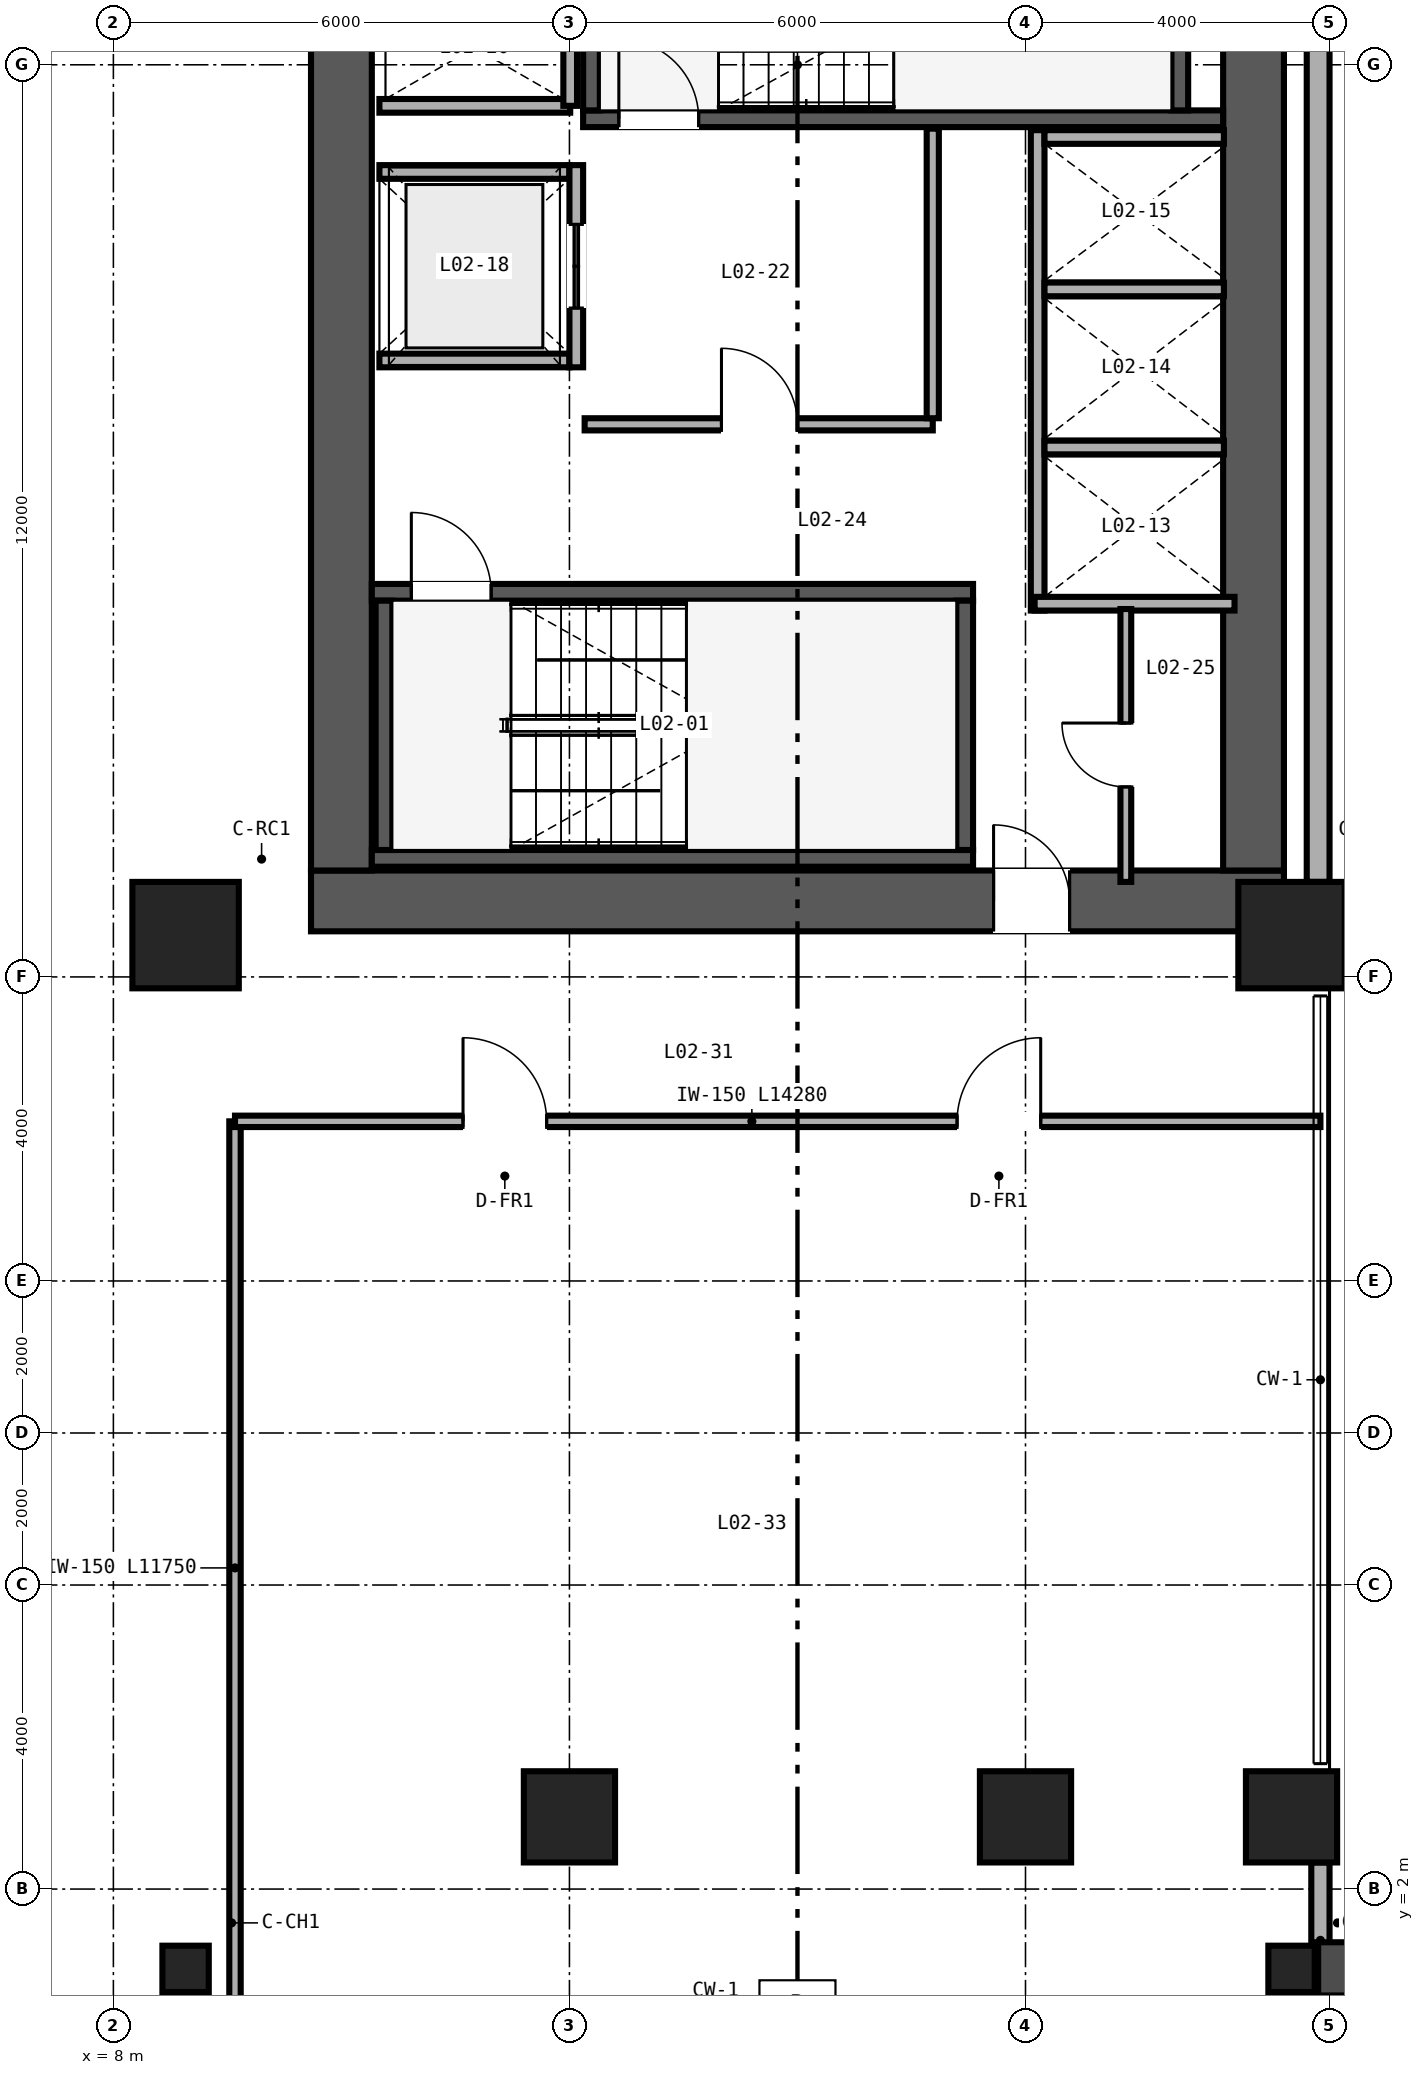
"""IFC4 building model, lengths in metres.
Left out: names, types, materials, properties, quantities, classifications, styles, units other than length and angle.
Written with IfcOpenShell. Run it as: python <this file> out.ifc"""

import sys

from ifc_helpers import new_model, si_unit, direction, frame, frame_2d, origin, origin_2d, place, context, subcontext, project, spatial, rectangle, hollow_circle, extrude, source, transform, mapped, element, fill, save


model = new_model("IFC4")
c1 = context("Model", 3, precision=1e-05, world=origin(), true_north=direction((0.0, 1.0)))
c2 = subcontext(c1, "Body", "Model", "MODEL_VIEW")
j1 = project(units=[si_unit("LENGTHUNIT", "METRE"), si_unit("PLANEANGLEUNIT", "RADIAN")], contexts=[c1])
p1 = place(None, origin())
s1 = spatial("IfcSite", under=j1, at=p1, CompositionType="ELEMENT")
p2 = place(p1, origin())
s2 = spatial("IfcBuilding", under=s1, at=p2, CompositionType="ELEMENT")
p3 = place(p2, frame((0.0, 0.0, 6.0)))
s3 = spatial("IfcBuildingStorey", under=s2, at=p3, CompositionType="ELEMENT", Elevation=6.0)
p4 = place(p3, frame((10.6, 15.0, 0.0), z_axis=(0.0, 0.0, 1.0), x_axis=(1.0, 0.0, 0.0)))
e1 = element("IfcWall", 1, at=p4, inside=s3, PredefinedType="SHEAR", context=c2, shape_type="SweptSolid", body=[
    extrude(rectangle(XDim=12.8, YDim=0.8, at=frame_2d((6.4, 0.0))), origin(), (0.0, 0.0, 1.0), 5.08),
])
p5 = place(p4, frame((8.98, 0.0, 0.0)))
e2 = element("IfcOpeningElement", 2, at=p5, cuts=e1, PredefinedType="OPENING", context=c2, shape_type="SweptSolid", body=[
    extrude(rectangle(XDim=1.0, YDim=2.15, at=frame_2d((0.5, 1.075))), frame((0.0, 0.41, 0.0), z_axis=(0.0, -1.0, 0.0), x_axis=(1.0, 0.0, 0.0)), (0.0, 0.0, 1.0), 0.82),
])
for number, where, z_axis, x_axis in (
    (3, (11.0, 15.4, 0.0), (0.0, 0.0, 1.0), (0.0, 1.0, 0.0)),
    (4, (23.0, 15.4, 0.0), (0.0, 0.0, 1.0), (0.0, 1.0, 0.0)),
):
    element("IfcWall", number, at=place(p3, frame(where, z_axis=z_axis, x_axis=x_axis)), inside=s3, PredefinedType="SHEAR", context=c2, shape_type="SweptSolid", body=[
        extrude(rectangle(XDim=21.2, YDim=0.8, at=frame_2d((10.6, 0.0))), origin(), (0.0, 0.0, 1.0), 5.08),
    ])
p6 = place(p3, frame((11.4, 15.56, 0.0), z_axis=(0.0, 0.0, 1.0), x_axis=(1.0, 0.0, 0.0)))
e5 = element("IfcWall", 5, at=p6, inside=s3, PredefinedType="SHEAR", context=c2, shape_type="SweptSolid", body=[
    extrude(rectangle(XDim=7.91, YDim=0.22, at=frame_2d((3.955, 0.0))), origin(), (0.0, 0.0, 1.0), 5.2),
])
p7 = place(p3, frame((11.4, 19.06, 0.0), z_axis=(0.0, 0.0, 1.0), x_axis=(1.0, 0.0, 0.0)))
e6 = element("IfcWall", 6, at=p7, inside=s3, PredefinedType="SHEAR", context=c2, shape_type="SweptSolid", body=[
    extrude(rectangle(XDim=7.91, YDim=0.22, at=frame_2d((3.955, 0.0))), origin(), (0.0, 0.0, 1.0), 5.2),
])
p8 = place(p7, frame((0.52, 0.0, 0.0)))
e7 = element("IfcOpeningElement", 7, at=p8, cuts=e6, PredefinedType="OPENING", context=c2, shape_type="SweptSolid", body=[
    extrude(rectangle(XDim=1.05, YDim=2.15, at=frame_2d((0.525, 1.075))), frame((0.0, 0.12, 0.0), z_axis=(0.0, -1.0, 0.0), x_axis=(1.0, 0.0, 0.0)), (0.0, 0.0, 1.0), 0.24),
])
for number, where, z_axis, x_axis in (
    (8, (11.56, 15.67, 0.0), (0.0, 0.0, 1.0), (0.0, 1.0, 0.0)),
    (9, (19.2, 15.67, 0.0), (0.0, 0.0, 1.0), (0.0, 1.0, 0.0)),
):
    element("IfcWall", number, at=place(p3, frame(where, z_axis=z_axis, x_axis=x_axis)), inside=s3, PredefinedType="SHEAR", context=c2, shape_type="SweptSolid", body=[
        extrude(rectangle(XDim=3.28, YDim=0.22, at=frame_2d((1.64, 0.0))), origin(), (0.0, 0.0, 1.0), 5.2),
    ])
p9 = place(p3, frame((14.18, 25.29, 0.0), z_axis=(0.0, 0.0, 1.0), x_axis=(1.0, 0.0, 0.0)))
e10 = element("IfcWall", 10, at=p9, inside=s3, PredefinedType="SHEAR", context=c2, shape_type="SweptSolid", body=[
    extrude(rectangle(XDim=8.42, YDim=0.22, at=frame_2d((4.21, 0.0))), origin(), (0.0, 0.0, 1.0), 5.2),
])
p10 = place(p9, frame((0.47, 0.0, 0.0)))
e11 = element("IfcOpeningElement", 11, at=p10, cuts=e10, PredefinedType="OPENING", context=c2, shape_type="SweptSolid", body=[
    extrude(rectangle(XDim=1.05, YDim=2.15, at=frame_2d((0.525, 1.075))), frame((0.0, 0.12, 0.0), z_axis=(0.0, -1.0, 0.0), x_axis=(1.0, 0.0, 0.0)), (0.0, 0.0, 1.0), 0.24),
])
for number, where, z_axis, x_axis in (
    (12, (14.29, 25.4, 0.0), (0.0, 0.0, 1.0), (0.0, 1.0, 0.0)),
    (13, (22.03, 25.4, 0.0), (0.0, 0.0, 1.0), (0.0, 1.0, 0.0)),
):
    element("IfcWall", number, at=place(p3, frame(where, z_axis=z_axis, x_axis=x_axis)), inside=s3, PredefinedType="SHEAR", context=c2, shape_type="SweptSolid", body=[
        extrude(rectangle(XDim=3.28, YDim=0.22, at=frame_2d((1.64, 0.0))), origin(), (0.0, 0.0, 1.0), 5.2),
    ])
m1 = source(origin(), c2, "Body", "SweptSolid", [
    extrude(hollow_circle(Radius=0.305, WallThickness=0.025, at=origin_2d()), origin(), (0.0, 0.0, 1.0), 5.08),
])
for number, where, z_axis, x_axis in (
    (14, (8.95, 0.95, 0.0), (0.0, 0.0, 1.0), (1.0, 0.0, 0.0)),
    (15, (23.5, 0.95, 0.0), (0.0, 0.0, 1.0), (1.0, 0.0, 0.0)),
):
    element("IfcColumn", number, at=place(p3, frame(where, z_axis=z_axis, x_axis=x_axis)), inside=s3, PredefinedType="COLUMN", context=c2, shape_type="MappedRepresentation", body=[
        mapped(m1, transform((0.0, 0.0, 0.0), scale=1.0)),
    ])
m2 = source(origin(), c2, "Body", "SweptSolid", [
    extrude(rectangle(XDim=1.4, YDim=1.4, at=origin_2d()), origin(), (0.0, 0.0, 1.0), 5.08),
])
for number, where, z_axis, x_axis in (
    (16, (8.95, 14.55, 0.0), (0.0, 0.0, 1.0), (1.0, 0.0, 0.0)),
    (17, (23.5, 14.55, 0.0), (0.0, 0.0, 1.0), (1.0, 0.0, 0.0)),
):
    element("IfcColumn", number, at=place(p3, frame(where, z_axis=z_axis, x_axis=x_axis)), inside=s3, PredefinedType="COLUMN", context=c2, shape_type="MappedRepresentation", body=[
        mapped(m2, transform((0.0, 0.0, 0.0), scale=1.0)),
    ])
m3 = source(origin(), c2, "Body", "SweptSolid", [
    extrude(rectangle(XDim=1.2, YDim=1.2, at=origin_2d()), origin(), (0.0, 0.0, 1.0), 5.08),
])
for number, where, z_axis, x_axis in (
    (18, (14.0, 2.95, 0.0), (0.0, 0.0, 1.0), (1.0, 0.0, 0.0)),
    (19, (20.0, 2.95, 0.0), (0.0, 0.0, 1.0), (1.0, 0.0, 0.0)),
    (20, (23.5, 2.95, 0.0), (0.0, 0.0, 1.0), (1.0, 0.0, 0.0)),
):
    element("IfcColumn", number, at=place(p3, frame(where, z_axis=z_axis, x_axis=x_axis)), inside=s3, PredefinedType="COLUMN", context=c2, shape_type="MappedRepresentation", body=[
        mapped(m3, transform((0.0, 0.0, 0.0), scale=1.0)),
    ])
p11 = place(p3, frame((23.88, 0.3, 0.0), z_axis=(0.0, 0.0, 1.0), x_axis=(0.0, 1.0, 0.0)))
e21 = element("IfcWall", 21, at=p11, inside=s3, PredefinedType="SOLIDWALL", context=c2, shape_type="SweptSolid", body=[
    extrude(rectangle(XDim=2.05, YDim=0.24, at=frame_2d((1.025, 0.0))), origin(), (0.0, 0.0, 1.0), 4.153),
])
p12 = place(p3, frame((23.85, 15.25, 0.0), z_axis=(0.0, 0.0, 1.0), x_axis=(0.0, 1.0, 0.0)))
e22 = element("IfcWall", 22, at=p12, inside=s3, PredefinedType="SOLIDWALL", context=c2, shape_type="SweptSolid", body=[
    extrude(rectangle(XDim=12.2, YDim=0.3, at=frame_2d((6.1, 0.0))), origin(), (0.0, 0.0, 1.0), 4.301),
])
p13 = place(p3, frame((20.16, 18.82, 0.0), z_axis=(0.0, 0.0, 1.0), x_axis=(0.0, 1.0, 0.0)))
e23 = element("IfcWall", 23, at=p13, inside=s3, PredefinedType="SOLIDWALL", context=c2, shape_type="SweptSolid", body=[
    extrude(rectangle(XDim=6.32, YDim=0.18, at=frame_2d((3.16, 0.0))), origin(), (0.0, 0.0, 1.0), 3.98),
])
p14 = place(p3, frame((20.12, 18.91, 0.0), z_axis=(0.0, 0.0, 1.0), x_axis=(1.0, 0.0, 0.0)))
e24 = element("IfcWall", 24, at=p14, inside=s3, PredefinedType="SOLIDWALL", context=c2, shape_type="SweptSolid", body=[
    extrude(rectangle(XDim=2.63, YDim=0.18, at=frame_2d((1.315, 0.0))), origin(), (0.0, 0.0, 1.0), 5.08),
])
p15 = place(p3, frame((20.25, 25.05, 0.0), z_axis=(0.0, 0.0, 1.0), x_axis=(1.0, 0.0, 0.0)))
e25 = element("IfcWall", 25, at=p15, inside=s3, PredefinedType="SOLIDWALL", context=c2, shape_type="SweptSolid", body=[
    extrude(rectangle(XDim=2.36, YDim=0.18, at=frame_2d((1.18, 0.0))), origin(), (0.0, 0.0, 1.0), 5.08),
])
p16 = place(p3, frame((20.25, 20.965, 0.0), z_axis=(0.0, 0.0, 1.0), x_axis=(1.0, 0.0, 0.0)))
e26 = element("IfcWall", 26, at=p16, inside=s3, PredefinedType="SOLIDWALL", context=c2, shape_type="SweptSolid", body=[
    extrude(rectangle(XDim=2.36, YDim=0.18, at=frame_2d((1.18, 0.0))), origin(), (0.0, 0.0, 1.0), 3.98),
])
p17 = place(p3, frame((20.25, 23.045, 0.0), z_axis=(0.0, 0.0, 1.0), x_axis=(1.0, 0.0, 0.0)))
e27 = element("IfcWall", 27, at=p17, inside=s3, PredefinedType="SOLIDWALL", context=c2, shape_type="SweptSolid", body=[
    extrude(rectangle(XDim=2.36, YDim=0.18, at=frame_2d((1.18, 0.0))), origin(), (0.0, 0.0, 1.0), 5.08),
])
for number, where, z_axis, x_axis in (
    (28, (11.5, 22.11, 0.0), (0.0, 0.0, 1.0), (1.0, 0.0, 0.0)),
    (29, (11.5, 24.59, 0.0), (0.0, 0.0, 1.0), (1.0, 0.0, 0.0)),
):
    element("IfcWall", number, at=place(p3, frame(where, z_axis=z_axis, x_axis=x_axis)), inside=s3, PredefinedType="SOLIDWALL", context=c2, shape_type="SweptSolid", body=[
        extrude(rectangle(XDim=2.5, YDim=0.18, at=frame_2d((1.25, 0.0))), origin(), (0.0, 0.0, 1.0), 5.08),
    ])
p18 = place(p3, frame((14.09, 22.02, 0.0), z_axis=(0.0, 0.0, 1.0), x_axis=(0.0, 1.0, 0.0)))
e30 = element("IfcWall", 30, at=p18, inside=s3, PredefinedType="SOLIDWALL", context=c2, shape_type="SweptSolid", body=[
    extrude(rectangle(XDim=2.66, YDim=0.18, at=frame_2d((1.33, 0.0))), origin(), (0.0, 0.0, 1.0), 5.08),
])
p19 = place(p18, frame((0.78, 0.0, 0.0)))
e31 = element("IfcOpeningElement", 31, at=p19, cuts=e30, PredefinedType="OPENING", context=c2, shape_type="SweptSolid", body=[
    extrude(rectangle(XDim=1.1, YDim=2.2, at=frame_2d((0.55, 1.1))), frame((0.0, 0.1, 0.0), z_axis=(0.0, -1.0, 0.0), x_axis=(1.0, 0.0, 0.0)), (0.0, 0.0, 1.0), 0.2),
])
p20 = place(p3, frame((11.5, 25.46, 0.0), z_axis=(0.0, 0.0, 1.0), x_axis=(1.0, 0.0, 0.0)))
e32 = element("IfcWall", 32, at=p20, inside=s3, PredefinedType="SOLIDWALL", context=c2, shape_type="SweptSolid", body=[
    extrude(rectangle(XDim=2.51, YDim=0.18, at=frame_2d((1.255, 0.0))), origin(), (0.0, 0.0, 1.0), 5.08),
])
p21 = place(p3, frame((14.01, 25.46, 0.0), z_axis=(0.0, 0.0, 1.0), x_axis=(0.0, 1.0, 0.0)))
e33 = element("IfcWall", 33, at=p21, inside=s3, PredefinedType="SOLIDWALL", context=c2, shape_type="SweptSolid", body=[
    extrude(rectangle(XDim=3.08, YDim=0.18, at=frame_2d((1.54, 0.0))), origin(), (0.0, 0.0, 1.0), 5.08),
])
p22 = place(p3, frame((14.2, 21.27, 0.0), z_axis=(0.0, 0.0, 1.0), x_axis=(1.0, 0.0, 0.0)))
e34 = element("IfcWall", 34, at=p22, inside=s3, PredefinedType="PARTITIONING", context=c2, shape_type="SweptSolid", body=[
    extrude(rectangle(XDim=4.58, YDim=0.16, at=frame_2d((2.29, 0.0))), origin(), (0.0, 0.0, 1.0), 5.08),
])
p23 = place(p22, frame((1.8, 0.0, 0.0)))
e35 = element("IfcOpeningElement", 35, at=p23, cuts=e34, PredefinedType="OPENING", context=c2, shape_type="SweptSolid", body=[
    extrude(rectangle(XDim=1.0, YDim=2.15, at=frame_2d((0.5, 1.075))), frame((0.0, 0.09, 0.0), z_axis=(0.0, -1.0, 0.0), x_axis=(1.0, 0.0, 0.0)), (0.0, 0.0, 1.0), 0.18),
])
p24 = place(p3, frame((18.78, 21.35, 0.0), z_axis=(0.0, 0.0, 1.0), x_axis=(0.0, 1.0, 0.0)))
e36 = element("IfcWall", 36, at=p24, inside=s3, PredefinedType="PARTITIONING", context=c2, shape_type="SweptSolid", body=[
    extrude(rectangle(XDim=3.81, YDim=0.16, at=frame_2d((1.905, 0.0))), origin(), (0.0, 0.0, 1.0), 5.08),
])
p25 = place(p3, frame((21.32, 15.25, 0.0), z_axis=(0.0, 0.0, 1.0), x_axis=(0.0, 1.0, 0.0)))
e37 = element("IfcWall", 37, at=p25, inside=s3, PredefinedType="PARTITIONING", context=c2, shape_type="SweptSolid", body=[
    extrude(rectangle(XDim=3.59, YDim=0.142, at=frame_2d((1.795, 0.0))), origin(), (0.0, 0.0, 1.0), 5.08),
])
p26 = place(p25, frame((1.25, 0.0, 0.0)))
e38 = element("IfcOpeningElement", 38, at=p26, cuts=e37, PredefinedType="OPENING", context=c2, shape_type="SweptSolid", body=[
    extrude(rectangle(XDim=0.84, YDim=2.1, at=frame_2d((0.42, 1.05))), frame((0.0, 0.081, 0.0), z_axis=(0.0, -1.0, 0.0), x_axis=(1.0, 0.0, 0.0)), (0.0, 0.0, 1.0), 0.162),
])
p27 = place(p3, frame((9.6, 0.35, 0.0), z_axis=(0.0, 0.0, 1.0), x_axis=(0.0, 1.0, 0.0)))
e39 = element("IfcWall", 39, at=p27, inside=s3, PredefinedType="PARTITIONING", context=c2, shape_type="SweptSolid", body=[
    extrude(rectangle(XDim=11.75, YDim=0.15, at=frame_2d((5.875, 0.0))), origin(), (0.0, 0.0, 1.0), 4.153),
])
p28 = place(p3, frame((9.6, 12.1, 0.0), z_axis=(0.0, 0.0, 1.0), x_axis=(1.0, 0.0, 0.0)))
e40 = element("IfcWall", 40, at=p28, inside=s3, PredefinedType="PARTITIONING", context=c2, shape_type="SweptSolid", body=[
    extrude(rectangle(XDim=14.28, YDim=0.15, at=frame_2d((7.14, 0.0))), origin(), (0.0, 0.0, 1.0), 4.301),
])
p29 = place(p28, frame((3.0, 0.0, 0.0)))
e41 = element("IfcOpeningElement", 41, at=p29, cuts=e40, PredefinedType="OPENING", context=c2, shape_type="SweptSolid", body=[
    extrude(rectangle(XDim=1.1, YDim=2.15, at=frame_2d((0.55, 1.075))), frame((0.0, 0.085, 0.0), z_axis=(0.0, -1.0, 0.0), x_axis=(1.0, 0.0, 0.0)), (0.0, 0.0, 1.0), 0.17),
])
p30 = place(p28, frame((9.5, 0.0, 0.0)))
e42 = element("IfcOpeningElement", 42, at=p30, cuts=e40, PredefinedType="OPENING", context=c2, shape_type="SweptSolid", body=[
    extrude(rectangle(XDim=1.1, YDim=2.15, at=frame_2d((0.55, 1.075))), frame((0.0, 0.085, 0.0), z_axis=(0.0, -1.0, 0.0), x_axis=(1.0, 0.0, 0.0)), (0.0, 0.0, 1.0), 0.17),
])
m4 = source(origin(), c2, "Body", "SweptSolid", [
    extrude(rectangle(XDim=1.05, YDim=2.15, at=frame_2d((0.525, 1.075))), frame((0.0, 0.025, 0.0), z_axis=(0.0, -1.0, 0.0), x_axis=(1.0, 0.0, 0.0)), (0.0, 0.0, 1.0), 0.05),
])
p31 = place(p8, origin())
e43 = element("IfcDoor", 43, at=p31, inside=s3, OperationType="SINGLE_SWING_LEFT", PredefinedType="DOOR", context=c2, shape_type="MappedRepresentation", body=[
    mapped(m4, transform((0.0, 0.0, 0.0), scale=1.0)),
])
fill(e7, e43)
p32 = place(p10, origin())
e44 = element("IfcDoor", 44, at=p32, inside=s3, OperationType="SINGLE_SWING_LEFT", PredefinedType="DOOR", context=c2, shape_type="MappedRepresentation", body=[
    mapped(m4, transform((0.0, 0.0, 0.0), scale=1.0)),
])
fill(e11, e44)
m5 = source(origin(), c2, "Body", "SweptSolid", [
    extrude(rectangle(XDim=1.1, YDim=2.2, at=frame_2d((0.55, 1.1))), frame((0.0, 0.025, 0.0), z_axis=(0.0, -1.0, 0.0), x_axis=(1.0, 0.0, 0.0)), (0.0, 0.0, 1.0), 0.05),
])
p33 = place(p19, origin())
e45 = element("IfcDoor", 45, at=p33, inside=s3, OperationType="DOUBLE_DOOR_SLIDING", PredefinedType="DOOR", context=c2, shape_type="MappedRepresentation", body=[
    mapped(m5, transform((0.0, 0.0, 0.0), scale=1.0)),
])
fill(e31, e45)
m6 = source(origin(), c2, "Body", "SweptSolid", [
    extrude(rectangle(XDim=1.0, YDim=2.15, at=frame_2d((0.5, 1.075))), frame((0.0, 0.025, 0.0), z_axis=(0.0, -1.0, 0.0), x_axis=(1.0, 0.0, 0.0)), (0.0, 0.0, 1.0), 0.05),
])
p34 = place(p23, origin())
e46 = element("IfcDoor", 46, at=p34, inside=s3, OperationType="SINGLE_SWING_LEFT", PredefinedType="DOOR", context=c2, shape_type="MappedRepresentation", body=[
    mapped(m6, transform((0.0, 0.0, 0.0), scale=1.0)),
])
fill(e35, e46)
m7 = source(origin(), c2, "Body", "SweptSolid", [
    extrude(rectangle(XDim=0.84, YDim=2.1, at=frame_2d((0.42, 1.05))), frame((0.0, 0.025, 0.0), z_axis=(0.0, -1.0, 0.0), x_axis=(1.0, 0.0, 0.0)), (0.0, 0.0, 1.0), 0.05),
])
p35 = place(p26, origin())
e47 = element("IfcDoor", 47, at=p35, inside=s3, OperationType="SINGLE_SWING_RIGHT", PredefinedType="DOOR", context=c2, shape_type="MappedRepresentation", body=[
    mapped(m7, transform((0.0, 0.0, 0.0), scale=1.0)),
])
fill(e38, e47)
p36 = place(p5, origin())
e48 = element("IfcDoor", 48, at=p36, inside=s3, OperationType="SINGLE_SWING_LEFT", PredefinedType="DOOR", context=c2, shape_type="MappedRepresentation", body=[
    mapped(m6, transform((0.0, 0.0, 0.0), scale=1.0)),
])
fill(e2, e48)
m8 = source(origin(), c2, "Body", "SweptSolid", [
    extrude(rectangle(XDim=1.1, YDim=2.15, at=frame_2d((0.55, 1.075))), frame((0.0, 0.025, 0.0), z_axis=(0.0, -1.0, 0.0), x_axis=(1.0, 0.0, 0.0)), (0.0, 0.0, 1.0), 0.05),
])
p37 = place(p29, origin())
e49 = element("IfcDoor", 49, at=p37, inside=s3, OperationType="SINGLE_SWING_LEFT", PredefinedType="DOOR", context=c2, shape_type="MappedRepresentation", body=[
    mapped(m8, transform((0.0, 0.0, 0.0), scale=1.0)),
])
fill(e41, e49)
p38 = place(p30, origin())
e50 = element("IfcDoor", 50, at=p38, inside=s3, OperationType="SINGLE_SWING_RIGHT", PredefinedType="DOOR", context=c2, shape_type="MappedRepresentation", body=[
    mapped(m8, transform((0.0, 0.0, 0.0), scale=1.0)),
])
fill(e42, e50)
save(model, sys.argv[1])
